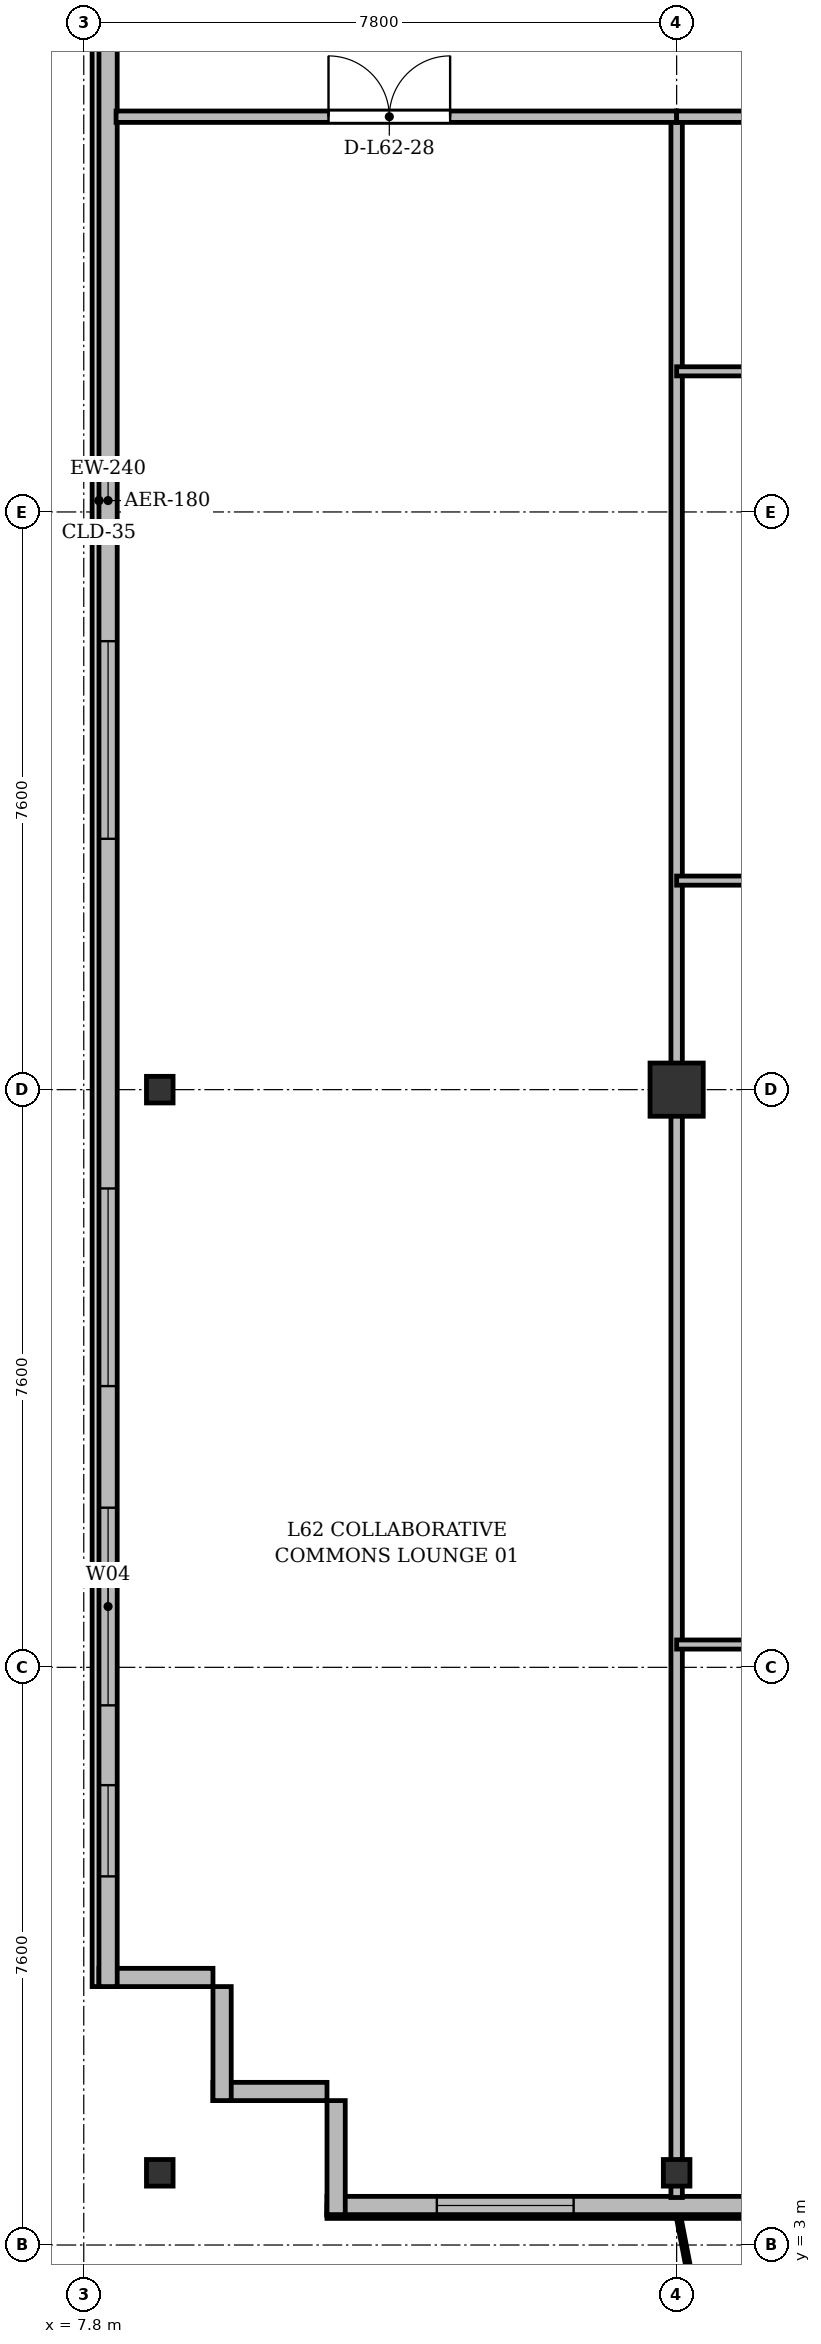
"""IFC4 building model, lengths in metres.
Left out: names, types, materials, properties, quantities, classifications, styles, units other than length and angle.
Written with IfcOpenShell. Run it as: python <this file> out.ifc"""

import sys

from ifc_helpers import new_model, si_unit, direction, frame, frame_2d, origin, origin_2d, place, context, subcontext, project, spatial, rectangle, i_section, extrude, source, transform, mapped, element, fill, save


model = new_model("IFC4")
c1 = context("Model", 3, precision=1e-05, world=origin(), true_north=direction((0.0, 1.0)))
c2 = subcontext(c1, "Body", "Model", "MODEL_VIEW")
j1 = project(units=[si_unit("LENGTHUNIT", "METRE"), si_unit("PLANEANGLEUNIT", "RADIAN")], contexts=[c1])
p1 = place(None, origin())
s1 = spatial("IfcSite", under=j1, at=p1, CompositionType="ELEMENT")
p2 = place(p1, origin())
s2 = spatial("IfcBuilding", under=s1, at=p2, CompositionType="ELEMENT")
p3 = place(p2, frame((0.0, 0.0, 237.3)))
s3 = spatial("IfcBuildingStorey", under=s2, at=p3, CompositionType="ELEMENT", Elevation=237.3)
m1 = source(origin(), c2, "Body", "SweptSolid", [
    extrude(i_section(OverallWidth=0.35, OverallDepth=0.35, WebThickness=0.018, FlangeThickness=0.028, at=origin_2d()), origin(), (0.0, 0.0, 1.0), 3.6),
])
for number, where, z_axis, x_axis in (
    (1, (8.8, 3.95, 0.0), (0.0, 0.0, 1.0), (1.0, 0.0, 0.0)),
    (2, (8.8, 18.2, 0.0), (0.0, 0.0, 1.0), (1.0, 0.0, 0.0)),
    (3, (15.6, 3.95, 0.0), (0.0, 0.0, 1.0), (1.0, 0.0, 0.0)),
):
    element("IfcColumn", number, at=place(p3, frame(where, z_axis=z_axis, x_axis=x_axis)), inside=s3, PredefinedType="COLUMN", context=c2, shape_type="MappedRepresentation", body=[
        mapped(m1, transform((0.0, 0.0, 0.0), x_axis=(1.0, 0.0, 0.0), y_axis=(0.0, 1.0, 0.0), z_axis=(0.0, 0.0, 1.0), scale=1.0)),
    ])
m2 = source(origin(), c2, "Body", "SweptSolid", [
    extrude(rectangle(XDim=0.7, YDim=0.7, at=origin_2d()), origin(), (0.0, 0.0, 1.0), 3.6),
])
p4 = place(p3, frame((15.6, 18.2, 0.0), z_axis=(0.0, 0.0, 1.0), x_axis=(1.0, 0.0, 0.0)))
e4 = element("IfcColumn", 4, at=p4, inside=s3, PredefinedType="COLUMN", context=c2, shape_type="MappedRepresentation", body=[
    mapped(m2, transform((0.0, 0.0, 0.0), x_axis=(1.0, 0.0, 0.0), y_axis=(0.0, 1.0, 0.0), z_axis=(0.0, 0.0, 1.0), scale=1.0)),
])
for number, where, z_axis, x_axis in (
    (5, (11.0, 5.02, 0.0), (0.0, 0.0, 1.0), (-1.0, 0.0, 0.0)),
    (6, (9.62, 4.9, 0.0), (0.0, 0.0, 1.0), (0.0, 1.0, 0.0)),
):
    element("IfcWall", number, at=place(p3, frame(where, z_axis=z_axis, x_axis=x_axis)), inside=s3, PredefinedType="SOLIDWALL", context=c2, shape_type="SweptSolid", body=[
        extrude(rectangle(XDim=1.5, YDim=0.24, at=frame_2d((0.75, 0.0))), origin(), (0.0, 0.0, 1.0), 3.22),
    ])
p5 = place(p3, frame((9.5, 6.52, 0.0), z_axis=(0.0, 0.0, 1.0), x_axis=(-1.0, 0.0, 0.0)))
e7 = element("IfcWall", 7, at=p5, inside=s3, PredefinedType="SOLIDWALL", context=c2, shape_type="SweptSolid", body=[
    extrude(rectangle(XDim=1.5, YDim=0.24, at=frame_2d((0.75, 0.0))), origin(), (0.0, 0.0, 1.0), 2.72),
])
p6 = place(p3, frame((8.12, 6.4, 0.0), z_axis=(0.0, 0.0, 1.0), x_axis=(0.0, 1.0, 0.0)))
e8 = element("IfcWall", 8, at=p6, inside=s3, PredefinedType="SOLIDWALL", context=c2, shape_type="SweptSolid", body=[
    extrude(rectangle(XDim=39.1, YDim=0.24, at=frame_2d((19.55, 0.0))), origin(), (0.0, 0.0, 1.0), 3.22),
])
p7 = place(p6, frame((1.45, 0.0, 0.92)))
e9 = element("IfcOpeningElement", 9, at=p7, cuts=e8, PredefinedType="OPENING", context=c2, shape_type="SweptSolid", body=[
    extrude(rectangle(XDim=1.2, YDim=1.65, at=frame_2d((0.6, 0.825))), frame((0.0, 0.13, 0.0), z_axis=(0.0, -1.0, 0.0), x_axis=(1.0, 0.0, 0.0)), (0.0, 0.0, 1.0), 0.26),
])
p8 = place(p6, frame((3.7, 0.0, 0.92)))
e10 = element("IfcOpeningElement", 10, at=p8, cuts=e8, PredefinedType="OPENING", context=c2, shape_type="SweptSolid", body=[
    extrude(rectangle(XDim=2.6, YDim=1.9, at=frame_2d((1.3, 0.95))), frame((0.0, 0.13, 0.0), z_axis=(0.0, -1.0, 0.0), x_axis=(1.0, 0.0, 0.0)), (0.0, 0.0, 1.0), 0.26),
])
p9 = place(p6, frame((7.9, 0.0, 0.92)))
e11 = element("IfcOpeningElement", 11, at=p9, cuts=e8, PredefinedType="OPENING", context=c2, shape_type="SweptSolid", body=[
    extrude(rectangle(XDim=2.6, YDim=1.9, at=frame_2d((1.3, 0.95))), frame((0.0, 0.13, 0.0), z_axis=(0.0, -1.0, 0.0), x_axis=(1.0, 0.0, 0.0)), (0.0, 0.0, 1.0), 0.26),
])
p10 = place(p6, frame((15.1, 0.0, 0.92)))
e12 = element("IfcOpeningElement", 12, at=p10, cuts=e8, PredefinedType="OPENING", context=c2, shape_type="SweptSolid", body=[
    extrude(rectangle(XDim=2.6, YDim=1.9, at=frame_2d((1.3, 0.95))), frame((0.0, 0.13, 0.0), z_axis=(0.0, -1.0, 0.0), x_axis=(1.0, 0.0, 0.0)), (0.0, 0.0, 1.0), 0.26),
])
p11 = place(p6, frame((29.1, 0.0, 0.92)))
e13 = element("IfcOpeningElement", 13, at=p11, cuts=e8, PredefinedType="OPENING", context=c2, shape_type="SweptSolid", body=[
    extrude(rectangle(XDim=2.6, YDim=1.9, at=frame_2d((1.3, 0.95))), frame((0.0, 0.13, 0.0), z_axis=(0.0, -1.0, 0.0), x_axis=(1.0, 0.0, 0.0)), (0.0, 0.0, 1.0), 0.26),
])
p12 = place(p6, frame((36.75, 0.0, 0.92)))
e14 = element("IfcOpeningElement", 14, at=p12, cuts=e8, PredefinedType="OPENING", context=c2, shape_type="SweptSolid", body=[
    extrude(rectangle(XDim=1.2, YDim=1.65, at=frame_2d((0.6, 0.825))), frame((0.0, 0.13, 0.0), z_axis=(0.0, -1.0, 0.0), x_axis=(1.0, 0.0, 0.0)), (0.0, 0.0, 1.0), 0.26),
])
p13 = place(p3, frame((44.8, 3.52, 0.0), z_axis=(0.0, 0.0, 1.0), x_axis=(-1.0, 0.0, 0.0)))
e15 = element("IfcWall", 15, at=p13, inside=s3, PredefinedType="SOLIDWALL", context=c2, shape_type="SweptSolid", body=[
    extrude(rectangle(XDim=33.8, YDim=0.24, at=frame_2d((16.9, 0.0))), origin(), (0.0, 0.0, 1.0), 3.22),
])
p14 = place(p13, frame((2.3, 0.0, 0.9)))
e16 = element("IfcOpeningElement", 16, at=p14, cuts=e15, PredefinedType="OPENING", context=c2, shape_type="SweptSolid", body=[
    extrude(rectangle(XDim=2.0, YDim=1.95, at=frame_2d((1.0, 0.975))), frame((0.0, 0.13, 0.0), z_axis=(0.0, -1.0, 0.0), x_axis=(1.0, 0.0, 0.0)), (0.0, 0.0, 1.0), 0.26),
])
p15 = place(p13, frame((6.208, 0.0, 0.9)))
e17 = element("IfcOpeningElement", 17, at=p15, cuts=e15, PredefinedType="OPENING", context=c2, shape_type="SweptSolid", body=[
    extrude(rectangle(XDim=1.65, YDim=1.85, at=frame_2d((0.825, 0.925))), frame((0.0, 0.13, 0.0), z_axis=(0.0, -1.0, 0.0), x_axis=(1.0, 0.0, 0.0)), (0.0, 0.0, 1.0), 0.26),
])
p16 = place(p13, frame((9.0, 0.0, 0.9)))
e18 = element("IfcOpeningElement", 18, at=p16, cuts=e15, PredefinedType="OPENING", context=c2, shape_type="SweptSolid", body=[
    extrude(rectangle(XDim=1.8, YDim=1.8, at=frame_2d((0.9, 0.9))), frame((0.0, 0.13, 0.0), z_axis=(0.0, -1.0, 0.0), x_axis=(1.0, 0.0, 0.0)), (0.0, 0.0, 1.0), 0.26),
])
p17 = place(p13, frame((11.666, 0.0, 0.9)))
e19 = element("IfcOpeningElement", 19, at=p17, cuts=e15, PredefinedType="OPENING", context=c2, shape_type="SweptSolid", body=[
    extrude(rectangle(XDim=2.2, YDim=1.8, at=frame_2d((1.1, 0.9))), frame((0.0, 0.13, 0.0), z_axis=(0.0, -1.0, 0.0), x_axis=(1.0, 0.0, 0.0)), (0.0, 0.0, 1.0), 0.26),
])
p18 = place(p13, frame((17.291, 0.0, 0.0)))
e20 = element("IfcOpeningElement", 20, at=p18, cuts=e15, PredefinedType="OPENING", context=c2, shape_type="SweptSolid", body=[
    extrude(rectangle(XDim=1.2, YDim=2.2, at=frame_2d((0.6, 1.1))), frame((0.0, 0.13, 0.0), z_axis=(0.0, -1.0, 0.0), x_axis=(1.0, 0.0, 0.0)), (0.0, 0.0, 1.0), 0.26),
])
p19 = place(p13, frame((22.35, 0.0, 0.9)))
e21 = element("IfcOpeningElement", 21, at=p19, cuts=e15, PredefinedType="OPENING", context=c2, shape_type="SweptSolid", body=[
    extrude(rectangle(XDim=2.0, YDim=1.95, at=frame_2d((1.0, 0.975))), frame((0.0, 0.13, 0.0), z_axis=(0.0, -1.0, 0.0), x_axis=(1.0, 0.0, 0.0)), (0.0, 0.0, 1.0), 0.26),
])
p20 = place(p13, frame((26.425, 0.0, 0.9)))
e22 = element("IfcOpeningElement", 22, at=p20, cuts=e15, PredefinedType="OPENING", context=c2, shape_type="SweptSolid", body=[
    extrude(rectangle(XDim=1.65, YDim=1.85, at=frame_2d((0.825, 0.925))), frame((0.0, 0.13, 0.0), z_axis=(0.0, -1.0, 0.0), x_axis=(1.0, 0.0, 0.0)), (0.0, 0.0, 1.0), 0.26),
])
p21 = place(p13, frame((30.555, 0.0, 0.9)))
e23 = element("IfcOpeningElement", 23, at=p21, cuts=e15, PredefinedType="OPENING", context=c2, shape_type="SweptSolid", body=[
    extrude(rectangle(XDim=1.8, YDim=1.8, at=frame_2d((0.9, 0.9))), frame((0.0, 0.13, 0.0), z_axis=(0.0, -1.0, 0.0), x_axis=(1.0, 0.0, 0.0)), (0.0, 0.0, 1.0), 0.26),
])
p22 = place(p3, frame((11.12, 3.4, 0.0), z_axis=(0.0, 0.0, 1.0), x_axis=(0.0, 1.0, 0.0)))
e24 = element("IfcWall", 24, at=p22, inside=s3, PredefinedType="SOLIDWALL", context=c2, shape_type="SweptSolid", body=[
    extrude(rectangle(XDim=1.5, YDim=0.24, at=frame_2d((0.75, 0.0))), origin(), (0.0, 0.0, 1.0), 2.77),
])
p23 = place(p3, frame((15.6, 3.625, 0.0), z_axis=(0.0, 0.0, 1.0), x_axis=(0.0, 1.0, 0.0)))
e25 = element("IfcWall", 25, at=p23, inside=s3, PredefinedType="PARTITIONING", context=c2, shape_type="SweptSolid", body=[
    extrude(rectangle(XDim=27.375, YDim=0.15, at=frame_2d((13.688, 0.0))), origin(), (0.0, 0.0, 1.0), 2.72),
])
p24 = place(p3, frame((8.225, 31.0, 0.0), z_axis=(0.0, 0.0, 1.0), x_axis=(1.0, 0.0, 0.0)))
e26 = element("IfcWall", 26, at=p24, inside=s3, PredefinedType="PARTITIONING", context=c2, shape_type="SweptSolid", body=[
    extrude(rectangle(XDim=7.375, YDim=0.15, at=frame_2d((3.688, 0.0))), origin(), (0.0, 0.0, 1.0), 2.72),
])
p25 = place(p24, frame((2.795, 0.0, 0.0)))
e27 = element("IfcOpeningElement", 27, at=p25, cuts=e26, PredefinedType="OPENING", context=c2, shape_type="SweptSolid", body=[
    extrude(rectangle(XDim=1.6, YDim=2.2, at=frame_2d((0.8, 1.1))), frame((0.0, 0.085, 0.0), z_axis=(0.0, -1.0, 0.0), x_axis=(1.0, 0.0, 0.0)), (0.0, 0.0, 1.0), 0.17),
])
p26 = place(p3, frame((15.6, 20.95, 0.0), z_axis=(0.0, 0.0, 1.0), x_axis=(1.0, 0.0, 0.0)))
e28 = element("IfcWall", 28, at=p26, inside=s3, PredefinedType="PARTITIONING", context=c2, shape_type="SweptSolid", body=[
    extrude(rectangle(XDim=7.8, YDim=0.12, at=frame_2d((3.9, 0.0))), origin(), (0.0, 0.0, 1.0), 2.72),
])
p27 = place(p26, frame((3.333, 0.0, 0.0)))
e29 = element("IfcOpeningElement", 29, at=p27, cuts=e28, PredefinedType="OPENING", context=c2, shape_type="SweptSolid", body=[
    extrude(rectangle(XDim=0.95, YDim=2.15, at=frame_2d((0.475, 1.075))), frame((0.0, 0.07, 0.0), z_axis=(0.0, -1.0, 0.0), x_axis=(1.0, 0.0, 0.0)), (0.0, 0.0, 1.0), 0.14),
])
p28 = place(p3, frame((15.6, 27.65, 0.0), z_axis=(0.0, 0.0, 1.0), x_axis=(1.0, 0.0, 0.0)))
e30 = element("IfcWall", 30, at=p28, inside=s3, PredefinedType="PARTITIONING", context=c2, shape_type="SweptSolid", body=[
    extrude(rectangle(XDim=2.4, YDim=0.12, at=frame_2d((1.2, 0.0))), origin(), (0.0, 0.0, 1.0), 2.72),
])
p29 = place(p3, frame((15.6, 31.0, 0.0), z_axis=(0.0, 0.0, 1.0), x_axis=(1.0, 0.0, 0.0)))
e31 = element("IfcWall", 31, at=p29, inside=s3, PredefinedType="PARTITIONING", context=c2, shape_type="SweptSolid", body=[
    extrude(rectangle(XDim=7.8, YDim=0.15, at=frame_2d((3.9, 0.0))), origin(), (0.0, 0.0, 1.0), 2.72),
])
p30 = place(p29, frame((5.172, 0.0, 0.0)))
e32 = element("IfcOpeningElement", 32, at=p30, cuts=e31, PredefinedType="OPENING", context=c2, shape_type="SweptSolid", body=[
    extrude(rectangle(XDim=0.95, YDim=2.15, at=frame_2d((0.475, 1.075))), frame((0.0, 0.085, 0.0), z_axis=(0.0, -1.0, 0.0), x_axis=(1.0, 0.0, 0.0)), (0.0, 0.0, 1.0), 0.17),
])
p31 = place(p3, frame((15.6, 10.9, 0.0), z_axis=(0.0, 0.0, 1.0), x_axis=(1.0, 0.0, 0.0)))
e33 = element("IfcWall", 33, at=p31, inside=s3, PredefinedType="PARTITIONING", context=c2, shape_type="SweptSolid", body=[
    extrude(rectangle(XDim=3.9, YDim=0.12, at=frame_2d((1.95, 0.0))), origin(), (0.0, 0.0, 1.0), 2.72),
])
p32 = place(p31, frame((1.475, 0.0, 0.0)))
e34 = element("IfcOpeningElement", 34, at=p32, cuts=e33, PredefinedType="OPENING", context=c2, shape_type="SweptSolid", body=[
    extrude(rectangle(XDim=0.95, YDim=2.15, at=frame_2d((0.475, 1.075))), frame((0.0, 0.07, 0.0), z_axis=(0.0, -1.0, 0.0), x_axis=(1.0, 0.0, 0.0)), (0.0, 0.0, 1.0), 0.14),
])
m3 = source(origin(), c2, "Body", "SweptSolid", [
    extrude(rectangle(XDim=1.2, YDim=1.65, at=frame_2d((0.6, 0.825))), frame((0.0, 0.03, 0.0), z_axis=(0.0, -1.0, 0.0), x_axis=(1.0, 0.0, 0.0)), (0.0, 0.0, 1.0), 0.06),
])
p33 = place(p7, origin())
e35 = element("IfcWindow", 35, at=p33, inside=s3, PartitioningType="SINGLE_PANEL", PredefinedType="WINDOW", context=c2, shape_type="MappedRepresentation", body=[
    mapped(m3, transform((0.0, 0.0, 0.0), x_axis=(1.0, 0.0, 0.0), y_axis=(0.0, 1.0, 0.0), z_axis=(0.0, 0.0, 1.0), scale=1.0)),
])
fill(e9, e35)
m4 = source(origin(), c2, "Body", "SweptSolid", [
    extrude(rectangle(XDim=2.6, YDim=1.9, at=frame_2d((1.3, 0.95))), frame((0.0, 0.03, 0.0), z_axis=(0.0, -1.0, 0.0), x_axis=(1.0, 0.0, 0.0)), (0.0, 0.0, 1.0), 0.06),
])
p34 = place(p8, origin())
e36 = element("IfcWindow", 36, at=p34, inside=s3, PartitioningType="SINGLE_PANEL", PredefinedType="WINDOW", context=c2, shape_type="MappedRepresentation", body=[
    mapped(m4, transform((0.0, 0.0, 0.0), x_axis=(1.0, 0.0, 0.0), y_axis=(0.0, 1.0, 0.0), z_axis=(0.0, 0.0, 1.0), scale=1.0)),
])
fill(e10, e36)
p35 = place(p9, origin())
e37 = element("IfcWindow", 37, at=p35, inside=s3, PartitioningType="SINGLE_PANEL", PredefinedType="WINDOW", context=c2, shape_type="MappedRepresentation", body=[
    mapped(m4, transform((0.0, 0.0, 0.0), x_axis=(1.0, 0.0, 0.0), y_axis=(0.0, 1.0, 0.0), z_axis=(0.0, 0.0, 1.0), scale=1.0)),
])
fill(e11, e37)
p36 = place(p10, origin())
e38 = element("IfcWindow", 38, at=p36, inside=s3, PartitioningType="SINGLE_PANEL", PredefinedType="WINDOW", context=c2, shape_type="MappedRepresentation", body=[
    mapped(m4, transform((0.0, 0.0, 0.0), x_axis=(1.0, 0.0, 0.0), y_axis=(0.0, 1.0, 0.0), z_axis=(0.0, 0.0, 1.0), scale=1.0)),
])
fill(e12, e38)
m5 = source(origin(), c2, "Body", "SweptSolid", [
    extrude(rectangle(XDim=1.8, YDim=1.8, at=frame_2d((0.9, 0.9))), frame((0.0, 0.03, 0.0), z_axis=(0.0, -1.0, 0.0), x_axis=(1.0, 0.0, 0.0)), (0.0, 0.0, 1.0), 0.06),
])
p37 = place(p21, origin())
e39 = element("IfcWindow", 39, at=p37, inside=s3, PartitioningType="SINGLE_PANEL", PredefinedType="WINDOW", context=c2, shape_type="MappedRepresentation", body=[
    mapped(m5, transform((0.0, 0.0, 0.0), x_axis=(1.0, 0.0, 0.0), y_axis=(0.0, 1.0, 0.0), z_axis=(0.0, 0.0, 1.0), scale=1.0)),
])
fill(e23, e39)
m6 = source(origin(), c2, "Body", "SweptSolid", [
    extrude(rectangle(XDim=1.6, YDim=2.2, at=frame_2d((0.8, 1.1))), frame((0.0, 0.025, 0.0), z_axis=(0.0, -1.0, 0.0), x_axis=(1.0, 0.0, 0.0)), (0.0, 0.0, 1.0), 0.05),
])
p38 = place(p25, origin())
e40 = element("IfcDoor", 40, at=p38, inside=s3, OperationType="DOUBLE_DOOR_SINGLE_SWING", PredefinedType="DOOR", context=c2, shape_type="MappedRepresentation", body=[
    mapped(m6, transform((0.0, 0.0, 0.0), x_axis=(1.0, 0.0, 0.0), y_axis=(0.0, 1.0, 0.0), z_axis=(0.0, 0.0, 1.0), scale=1.0)),
])
fill(e27, e40)
save(model, sys.argv[1])
